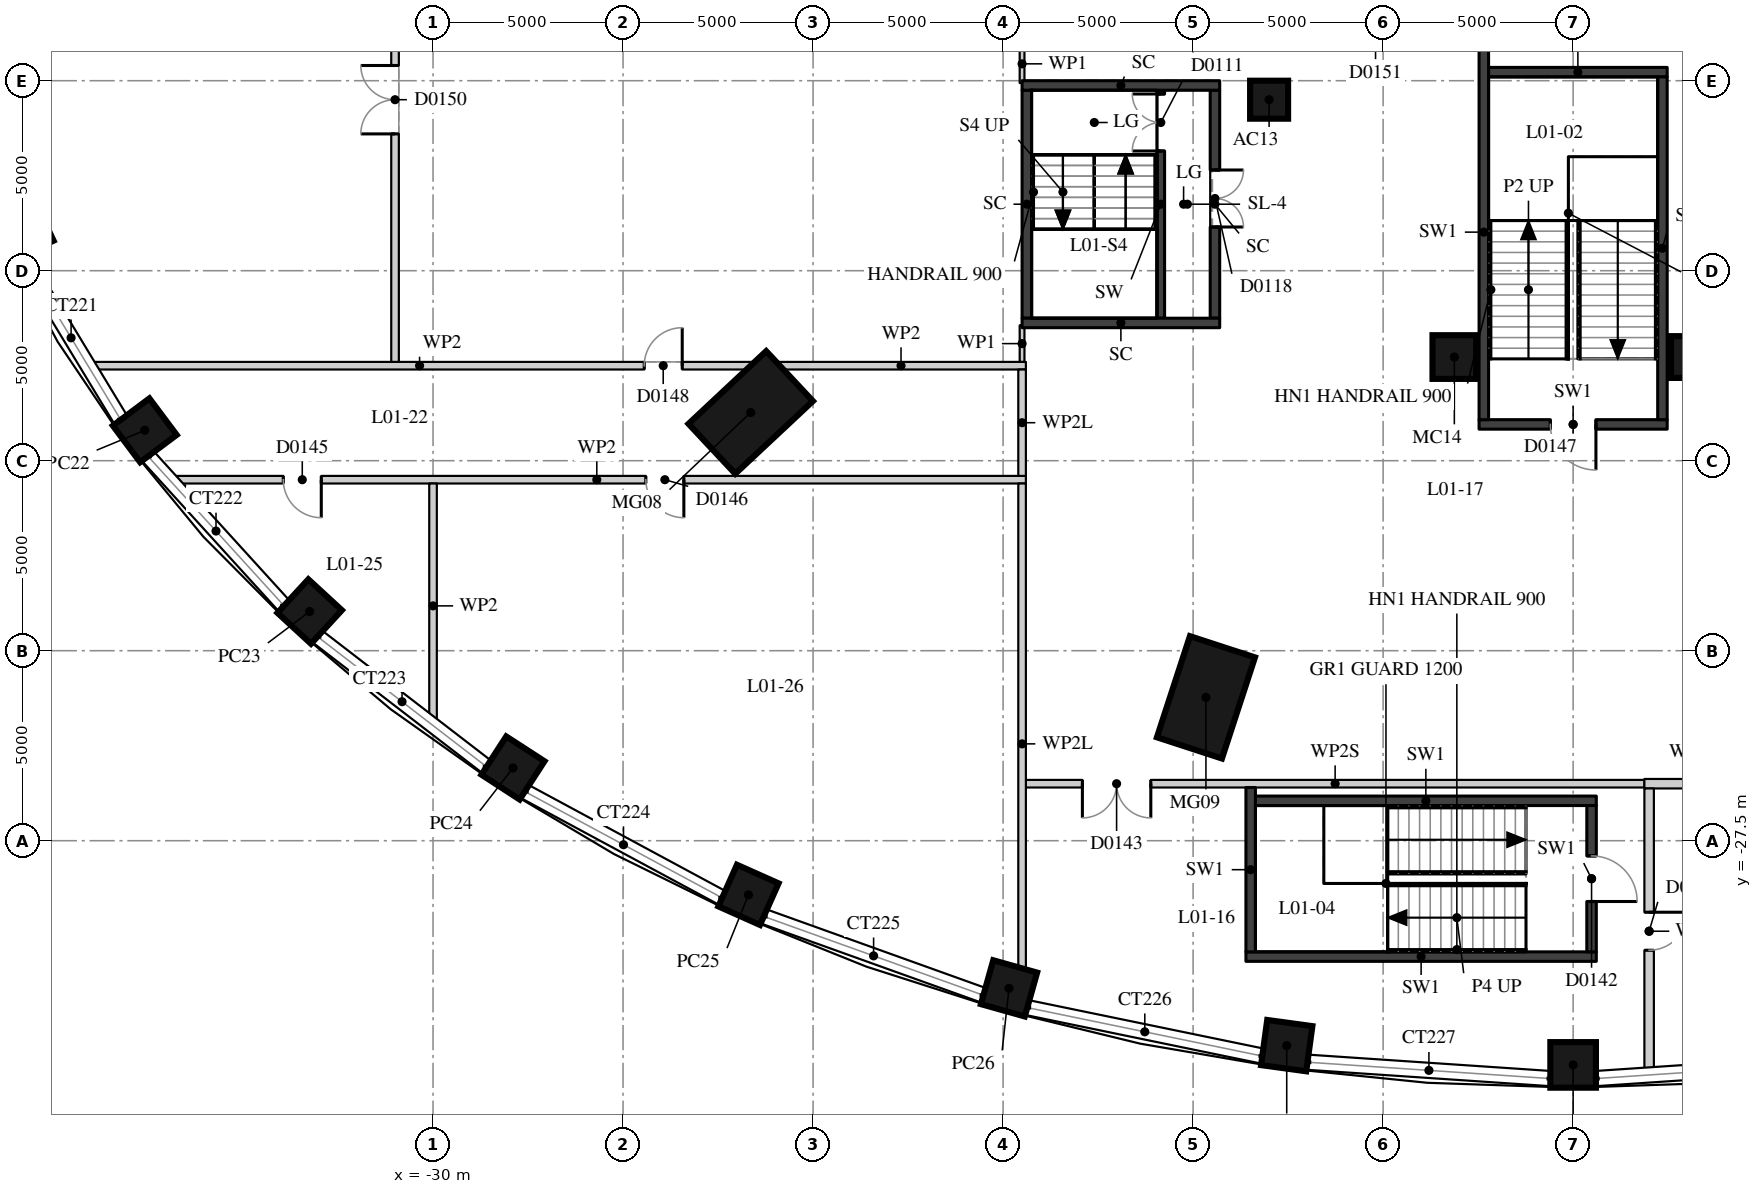
"""IFC4 building model, lengths in metres.
Left out: names, types, materials, properties, quantities, classifications, styles, units other than length and angle.
Written with IfcOpenShell. Run it as: python <this file> out.ifc"""

import sys

from ifc_helpers import new_model, si_unit, direction, frame, frame_2d, origin, origin_2d, place, context, subcontext, project, spatial, rectangle, extrude, element, fill, save


model = new_model("IFC4")
c1 = context("Model", 3, precision=1e-05, world=origin(), true_north=direction((0.0, 1.0)))
c2 = subcontext(c1, "Body", "Model", "MODEL_VIEW")
j1 = project(units=[si_unit("LENGTHUNIT", "METRE"), si_unit("PLANEANGLEUNIT", "RADIAN")], contexts=[c1])
p1 = place(None, origin())
s1 = spatial("IfcSite", under=j1, at=p1, CompositionType="ELEMENT")
p2 = place(p1, origin())
s2 = spatial("IfcBuilding", under=s1, at=p2, CompositionType="ELEMENT")
p3 = place(p2, frame((0.0, 0.0, 7.5)))
s3 = spatial("IfcBuildingStorey", under=s2, at=p3, CompositionType="ELEMENT", Elevation=7.5)
for number, where, z_axis, x_axis in (
    (1, (-21.641, -16.23, 0.0), (0.0, 0.0, 1.0), (-0.73, -0.683, 0.0)),
    (2, (-9.662, -23.727, 0.0), (0.0, 0.0, 1.0), (-0.31, -0.951, 0.0)),
):
    element("IfcColumn", number, at=place(p3, frame(where, z_axis=z_axis, x_axis=x_axis)), inside=s3, PredefinedType="COLUMN", context=c2, shape_type="SweptSolid", body=[
        extrude(rectangle(XDim=2.8, YDim=1.8, at=origin_2d()), origin(), (0.0, 0.0, 1.0), 5.0),
    ])
p4 = place(p3, frame((-8.0, -8.0, 0.0), z_axis=(0.0, 0.0, 1.0), x_axis=(1.0, 0.0, 0.0)))
e3 = element("IfcColumn", 3, at=p4, inside=s3, PredefinedType="COLUMN", context=c2, shape_type="SweptSolid", body=[
    extrude(rectangle(XDim=1.0, YDim=1.0, at=origin_2d()), origin(), (0.0, 0.0, 1.0), 5.0),
])
p5 = place(p3, frame((-3.126, -14.772, 0.0), z_axis=(0.0, 0.0, 1.0), x_axis=(1.0, 0.0, 0.0)))
e4 = element("IfcColumn", 4, at=p5, inside=s3, PredefinedType="COLUMN", context=c2, shape_type="SweptSolid", body=[
    extrude(rectangle(XDim=1.15, YDim=1.15, at=origin_2d()), origin(), (0.0, 0.0, 1.0), 5.0),
])
p6 = place(p3, frame((3.126, -14.772, 0.0), z_axis=(0.0, 0.0, 1.0), x_axis=(1.0, 0.0, 0.0)))
e5 = element("IfcColumn", 5, at=p6, inside=s3, PredefinedType="COLUMN", context=c2, shape_type="SweptSolid", body=[
    extrude(rectangle(XDim=1.1, YDim=1.1, at=origin_2d()), origin(), (0.0, 0.0, 1.0), 5.0),
])
for number, where, z_axis, x_axis in (
    (6, (-40.783, -11.424, 0.0), (0.0, 0.0, 1.0), (-0.905, -0.426, 0.0)),
    (7, (-37.585, -16.7, 0.0), (0.0, 0.0, 1.0), (-0.801, -0.599, 0.0)),
    (8, (-33.246, -21.469, 0.0), (0.0, 0.0, 1.0), (-0.677, -0.736, 0.0)),
    (9, (-27.897, -25.586, 0.0), (0.0, 0.0, 1.0), (-0.544, -0.839, 0.0)),
    (10, (-21.7, -28.925, 0.0), (0.0, 0.0, 1.0), (-0.407, -0.913, 0.0)),
    (11, (-14.844, -31.386, 0.0), (0.0, 0.0, 1.0), (-0.271, -0.963, 0.0)),
    (12, (-7.536, -32.893, 0.0), (0.0, 0.0, 1.0), (-0.135, -0.991, 0.0)),
    (13, (0.0, -33.4, 0.0), (0.0, 0.0, 1.0), (0.0, -1.0, 0.0)),
):
    element("IfcColumn", number, at=place(p3, frame(where, z_axis=z_axis, x_axis=x_axis)), inside=s3, PredefinedType="COLUMN", context=c2, shape_type="SweptSolid", body=[
        extrude(rectangle(XDim=1.2, YDim=1.2, at=origin_2d()), origin(), (0.0, 0.0, 1.0), 5.0),
    ])
p7 = place(p3, frame((-10.85, -13.75, 0.0), z_axis=(0.0, 0.0, 1.0), x_axis=(0.0, 1.0, 0.0)))
e14 = element("IfcWall", 14, at=p7, inside=s3, PredefinedType="SHEAR", context=c2, shape_type="SweptSolid", body=[
    extrude(rectangle(XDim=6.0, YDim=0.2, at=frame_2d((3.0, 0.0))), origin(), (0.0, 0.0, 1.0), 4.59),
])
p8 = place(p7, frame((4.4, 0.0, 0.0)))
e15 = element("IfcOpeningElement", 15, at=p8, cuts=e14, PredefinedType="OPENING", context=c2, shape_type="SweptSolid", body=[
    extrude(rectangle(XDim=1.5, YDim=2.1, at=frame_2d((0.75, 1.05))), frame((0.0, 0.11, 0.0), z_axis=(0.0, -1.0, 0.0), x_axis=(1.0, 0.0, 0.0)), (0.0, 0.0, 1.0), 0.22),
])
p9 = place(p3, frame((-14.375, -13.75, -0.41), z_axis=(0.0, 0.0, 1.0), x_axis=(0.0, 1.0, 0.0)))
e16 = element("IfcWall", 16, at=p9, inside=s3, PredefinedType="SHEAR", context=c2, shape_type="SweptSolid", body=[
    extrude(rectangle(XDim=6.0, YDim=0.25, at=frame_2d((3.0, 0.0))), origin(), (0.0, 0.0, 1.0), 5.0),
])
p10 = place(p3, frame((-9.425, -13.75, -0.41), z_axis=(0.0, 0.0, 1.0), x_axis=(0.0, 1.0, 0.0)))
e17 = element("IfcWall", 17, at=p10, inside=s3, PredefinedType="SHEAR", context=c2, shape_type="SweptSolid", body=[
    extrude(rectangle(XDim=6.0, YDim=0.25, at=frame_2d((3.0, 0.0))), origin(), (0.0, 0.0, 1.0), 5.0),
])
p11 = place(p10, frame((2.4, 0.0, 0.41)))
e18 = element("IfcOpeningElement", 18, at=p11, cuts=e17, PredefinedType="OPENING", context=c2, shape_type="SweptSolid", body=[
    extrude(rectangle(XDim=1.5, YDim=2.1, at=frame_2d((0.75, 1.05))), frame((0.0, 0.135, 0.0), z_axis=(0.0, -1.0, 0.0), x_axis=(1.0, 0.0, 0.0)), (0.0, 0.0, 1.0), 0.27),
])
for number, where, z_axis, x_axis in (
    (19, (-14.5, -7.625, -0.41), (0.0, 0.0, 1.0), (1.0, 0.0, 0.0)),
    (20, (-14.5, -13.875, -0.41), (0.0, 0.0, 1.0), (1.0, 0.0, 0.0)),
):
    element("IfcWall", number, at=place(p3, frame(where, z_axis=z_axis, x_axis=x_axis)), inside=s3, PredefinedType="SHEAR", context=c2, shape_type="SweptSolid", body=[
        extrude(rectangle(XDim=5.2, YDim=0.25, at=frame_2d((2.6, 0.0))), origin(), (0.0, 0.0, 1.0), 5.0),
    ])
p12 = place(p3, frame((-8.61, -30.55, 0.0), z_axis=(0.0, 0.0, 1.0), x_axis=(1.0, 0.0, 0.0)))
e21 = element("IfcWall", 21, at=p12, inside=s3, PredefinedType="SOLIDWALL", context=c2, shape_type="SweptSolid", body=[
    extrude(rectangle(XDim=9.22, YDim=0.25, at=frame_2d((4.61, 0.0))), origin(), (0.0, 0.0, 1.0), 4.59),
])
p13 = place(p3, frame((-8.36, -26.45, 0.0), z_axis=(0.0, 0.0, 1.0), x_axis=(1.0, 0.0, 0.0)))
e22 = element("IfcWall", 22, at=p13, inside=s3, PredefinedType="SOLIDWALL", context=c2, shape_type="SweptSolid", body=[
    extrude(rectangle(XDim=8.97, YDim=0.25, at=frame_2d((4.485, 0.0))), origin(), (0.0, 0.0, 1.0), 4.59),
])
p14 = place(p3, frame((-14.4, -26.0, 0.0), z_axis=(0.0, 0.0, 1.0), x_axis=(1.0, 0.0, 0.0)))
e23 = element("IfcWall", 23, at=p14, inside=s3, PredefinedType="PARTITIONING", context=c2, shape_type="SweptSolid", body=[
    extrude(rectangle(XDim=16.275, YDim=0.2, at=frame_2d((8.137, 0.0))), origin(), (0.0, 0.0, 1.0), 3.69),
])
p15 = place(p14, frame((1.487, 0.0, 0.0)))
e24 = element("IfcOpeningElement", 24, at=p15, cuts=e23, PredefinedType="OPENING", context=c2, shape_type="SweptSolid", body=[
    extrude(rectangle(XDim=1.8, YDim=2.1, at=frame_2d((0.9, 1.05))), frame((0.0, 0.11, 0.0), z_axis=(0.0, -1.0, 0.0), x_axis=(1.0, 0.0, 0.0)), (0.0, 0.0, 1.0), 0.22),
])
p16 = place(p3, frame((1.875, -26.0, 0.0), z_axis=(0.0, 0.0, 1.0), x_axis=(1.0, 0.0, 0.0)))
e25 = element("IfcWall", 25, at=p16, inside=s3, PredefinedType="PARTITIONING", context=c2, shape_type="SweptSolid", body=[
    extrude(rectangle(XDim=2.32, YDim=0.25, at=frame_2d((1.16, 0.0))), origin(), (0.0, 0.0, 1.0), 4.59),
])
p17 = place(p3, frame((-36.982, -18.0, 0.0), z_axis=(0.0, 0.0, 1.0), x_axis=(1.0, 0.0, 0.0)))
e26 = element("IfcWall", 26, at=p17, inside=s3, PredefinedType="PARTITIONING", context=c2, shape_type="SweptSolid", body=[
    extrude(rectangle(XDim=22.582, YDim=0.2, at=frame_2d((11.291, 0.0))), origin(), (0.0, 0.0, 1.0), 4.59),
])
p18 = place(p17, frame((3.041, 0.0, 0.0)))
e27 = element("IfcOpeningElement", 27, at=p18, cuts=e26, PredefinedType="OPENING", context=c2, shape_type="SweptSolid", body=[
    extrude(rectangle(XDim=1.0, YDim=2.1, at=frame_2d((0.5, 1.05))), frame((0.0, 0.11, 0.0), z_axis=(0.0, -1.0, 0.0), x_axis=(1.0, 0.0, 0.0)), (0.0, 0.0, 1.0), 0.22),
])
p19 = place(p17, frame((12.582, 0.0, 0.0)))
e28 = element("IfcOpeningElement", 28, at=p19, cuts=e26, PredefinedType="OPENING", context=c2, shape_type="SweptSolid", body=[
    extrude(rectangle(XDim=1.0, YDim=2.1, at=frame_2d((0.5, 1.05))), frame((0.0, 0.11, 0.0), z_axis=(0.0, -1.0, 0.0), x_axis=(1.0, 0.0, 0.0)), (0.0, 0.0, 1.0), 0.22),
])
p20 = place(p3, frame((-2.475, -16.545, 0.0), z_axis=(0.0, 0.0, 1.0), x_axis=(1.0, 0.0, 0.0)))
e29 = element("IfcWall", 29, at=p20, inside=s3, PredefinedType="SOLIDWALL", context=c2, shape_type="SweptSolid", body=[
    extrude(rectangle(XDim=4.95, YDim=0.25, at=frame_2d((2.475, 0.0))), origin(), (0.0, 0.0, 1.0), 4.59),
])
p21 = place(p20, frame((1.875, 0.0, 0.0)))
e30 = element("IfcOpeningElement", 30, at=p21, cuts=e29, PredefinedType="OPENING", context=c2, shape_type="SweptSolid", body=[
    extrude(rectangle(XDim=1.2, YDim=2.1, at=frame_2d((0.6, 1.05))), frame((0.0, 0.135, 0.0), z_axis=(0.0, -1.0, 0.0), x_axis=(1.0, 0.0, 0.0)), (0.0, 0.0, 1.0), 0.27),
])
p22 = place(p3, frame((-39.165, -15.0, 0.0), z_axis=(0.0, 0.0, 1.0), x_axis=(1.0, 0.0, 0.0)))
e31 = element("IfcWall", 31, at=p22, inside=s3, PredefinedType="PARTITIONING", context=c2, shape_type="SweptSolid", body=[
    extrude(rectangle(XDim=17.622, YDim=0.2, at=frame_2d((8.811, 0.0))), origin(), (0.0, 0.0, 1.0), 4.59),
])
p23 = place(p22, frame((14.722, 0.0, 0.0)))
e32 = element("IfcOpeningElement", 32, at=p23, cuts=e31, PredefinedType="OPENING", context=c2, shape_type="SweptSolid", body=[
    extrude(rectangle(XDim=1.0, YDim=2.1, at=frame_2d((0.5, 1.05))), frame((0.0, 0.11, 0.0), z_axis=(0.0, -1.0, 0.0), x_axis=(1.0, 0.0, 0.0)), (0.0, 0.0, 1.0), 0.22),
])
p24 = place(p3, frame((-20.971, -15.0, 0.0), z_axis=(0.0, 0.0, 1.0), x_axis=(1.0, 0.0, 0.0)))
e33 = element("IfcWall", 33, at=p24, inside=s3, PredefinedType="PARTITIONING", context=c2, shape_type="SweptSolid", body=[
    extrude(rectangle(XDim=6.571, YDim=0.2, at=frame_2d((3.286, 0.0))), origin(), (0.0, 0.0, 1.0), 4.59),
])
p25 = place(p3, frame((-2.225, -7.275, 0.0), z_axis=(0.0, 0.0, 1.0), x_axis=(1.0, 0.0, 0.0)))
e34 = element("IfcWall", 34, at=p25, inside=s3, PredefinedType="SOLIDWALL", context=c2, shape_type="SweptSolid", body=[
    extrude(rectangle(XDim=4.7, YDim=0.25, at=frame_2d((2.35, 0.0))), origin(), (0.0, 0.0, 1.0), 4.59),
])
p26 = place(p3, frame((-31.0, -14.9, 0.0), z_axis=(0.0, 0.0, 1.0), x_axis=(0.0, 1.0, 0.0)))
e35 = element("IfcWall", 35, at=p26, inside=s3, PredefinedType="PARTITIONING", context=c2, shape_type="SweptSolid", body=[
    extrude(rectangle(XDim=29.8, YDim=0.2, at=frame_2d((14.9, 0.0))), origin(), (0.0, 0.0, 1.0), 4.59),
])
p27 = place(p26, frame((6.0, 0.0, 0.0)))
e36 = element("IfcOpeningElement", 36, at=p27, cuts=e35, PredefinedType="OPENING", context=c2, shape_type="SweptSolid", body=[
    extrude(rectangle(XDim=1.8, YDim=2.1, at=frame_2d((0.9, 1.05))), frame((0.0, 0.11, 0.0), z_axis=(0.0, -1.0, 0.0), x_axis=(1.0, 0.0, 0.0)), (0.0, 0.0, 1.0), 0.22),
])
p28 = place(p3, frame((-30.0, -24.54, 0.0), z_axis=(0.0, 0.0, 1.0), x_axis=(0.0, 1.0, 0.0)))
e37 = element("IfcWall", 37, at=p28, inside=s3, PredefinedType="PARTITIONING", context=c2, shape_type="SweptSolid", body=[
    extrude(rectangle(XDim=6.44, YDim=0.2, at=frame_2d((3.22, 0.0))), origin(), (0.0, 0.0, 1.0), 4.59),
])
p29 = place(p3, frame((-14.5, -31.803, 0.0), z_axis=(0.0, 0.0, 1.0), x_axis=(0.0, 1.0, 0.0)))
e38 = element("IfcWall", 38, at=p29, inside=s3, PredefinedType="PARTITIONING", context=c2, shape_type="SweptSolid", body=[
    extrude(rectangle(XDim=13.703, YDim=0.2, at=frame_2d((6.852, 0.0))), origin(), (0.0, 0.0, 1.0), 4.14),
])
p30 = place(p3, frame((-14.5, -17.9, 0.0), z_axis=(0.0, 0.0, 1.0), x_axis=(0.0, 1.0, 0.0)))
e39 = element("IfcWall", 39, at=p30, inside=s3, PredefinedType="PARTITIONING", context=c2, shape_type="SweptSolid", body=[
    extrude(rectangle(XDim=2.8, YDim=0.2, at=frame_2d((1.4, 0.0))), origin(), (0.0, 0.0, 1.0), 4.14),
])
p31 = place(p3, frame((-14.5, -14.9, 0.0), z_axis=(0.0, 0.0, 1.0), x_axis=(0.0, 1.0, 0.0)))
e40 = element("IfcWall", 40, at=p31, inside=s3, PredefinedType="PARTITIONING", context=c2, shape_type="SweptSolid", body=[
    extrude(rectangle(XDim=0.962, YDim=0.125, at=frame_2d((0.481, 0.0))), origin(), (0.0, 0.0, 1.0), 4.59),
])
p32 = place(p3, frame((-14.5, -7.562, 0.0), z_axis=(0.0, 0.0, 1.0), x_axis=(0.0, 1.0, 0.0)))
e41 = element("IfcWall", 41, at=p32, inside=s3, PredefinedType="PARTITIONING", context=c2, shape_type="SweptSolid", body=[
    extrude(rectangle(XDim=1.012, YDim=0.125, at=frame_2d((0.506, 0.0))), origin(), (0.0, 0.0, 1.0), 4.59),
])
p33 = place(p3, frame((-8.485, -30.425, 0.0), z_axis=(0.0, 0.0, 1.0), x_axis=(0.0, 1.0, 0.0)))
e42 = element("IfcWall", 42, at=p33, inside=s3, PredefinedType="SOLIDWALL", context=c2, shape_type="SweptSolid", body=[
    extrude(rectangle(XDim=4.325, YDim=0.25, at=frame_2d((2.163, 0.0))), origin(), (0.0, 0.0, 1.0), 4.59),
])
p34 = place(p3, frame((-2.35, -16.42, 0.0), z_axis=(0.0, 0.0, 1.0), x_axis=(0.0, 1.0, 0.0)))
e43 = element("IfcWall", 43, at=p34, inside=s3, PredefinedType="SOLIDWALL", context=c2, shape_type="SweptSolid", body=[
    extrude(rectangle(XDim=9.87, YDim=0.25, at=frame_2d((4.935, 0.0))), origin(), (0.0, 0.0, 1.0), 4.59),
])
p35 = place(p3, frame((0.485, -30.425, 0.0), z_axis=(0.0, 0.0, 1.0), x_axis=(0.0, 1.0, 0.0)))
e44 = element("IfcWall", 44, at=p35, inside=s3, PredefinedType="SOLIDWALL", context=c2, shape_type="SweptSolid", body=[
    extrude(rectangle(XDim=3.85, YDim=0.25, at=frame_2d((1.925, 0.0))), origin(), (0.0, 0.0, 1.0), 4.59),
])
p36 = place(p35, frame((1.325, 0.0, 0.0)))
e45 = element("IfcOpeningElement", 45, at=p36, cuts=e44, PredefinedType="OPENING", context=c2, shape_type="SweptSolid", body=[
    extrude(rectangle(XDim=1.2, YDim=2.1, at=frame_2d((0.6, 1.05))), frame((0.0, 0.135, 0.0), z_axis=(0.0, -1.0, 0.0), x_axis=(1.0, 0.0, 0.0)), (0.0, 0.0, 1.0), 0.27),
])
p37 = place(p3, frame((2.0, -33.639, 0.0), z_axis=(0.0, 0.0, 1.0), x_axis=(0.0, 1.0, 0.0)))
e46 = element("IfcWall", 46, at=p37, inside=s3, PredefinedType="PARTITIONING", context=c2, shape_type="SweptSolid", body=[
    extrude(rectangle(XDim=7.514, YDim=0.25, at=frame_2d((3.757, 0.0))), origin(), (0.0, 0.0, 1.0), 4.59),
])
p38 = place(p37, frame((3.257, 0.0, 0.0)))
e47 = element("IfcOpeningElement", 47, at=p38, cuts=e46, PredefinedType="OPENING", context=c2, shape_type="SweptSolid", body=[
    extrude(rectangle(XDim=1.0, YDim=2.1, at=frame_2d((0.5, 1.05))), frame((0.0, 0.135, 0.0), z_axis=(0.0, -1.0, 0.0), x_axis=(1.0, 0.0, 0.0)), (0.0, 0.0, 1.0), 0.27),
])
p39 = place(p3, frame((2.35, -16.42, 0.0), z_axis=(0.0, 0.0, 1.0), x_axis=(0.0, 1.0, 0.0)))
e48 = element("IfcWall", 48, at=p39, inside=s3, PredefinedType="SOLIDWALL", context=c2, shape_type="SweptSolid", body=[
    extrude(rectangle(XDim=9.02, YDim=0.25, at=frame_2d((4.51, 0.0))), origin(), (0.0, 0.0, 1.0), 4.59),
])
p40 = place(p8, origin())
e49 = element("IfcDoor", 49, at=p40, inside=s3, OperationType="DOUBLE_DOOR_SINGLE_SWING", PredefinedType="DOOR", context=c2, shape_type="SweptSolid", body=[
    extrude(rectangle(XDim=1.5, YDim=2.1, at=frame_2d((0.75, 1.05))), frame((0.0, 0.025, 0.0), z_axis=(0.0, -1.0, 0.0), x_axis=(1.0, 0.0, 0.0)), (0.0, 0.0, 1.0), 0.05),
])
fill(e15, e49)
p41 = place(p11, origin())
e50 = element("IfcDoor", 50, at=p41, inside=s3, OperationType="DOUBLE_DOOR_SINGLE_SWING", PredefinedType="DOOR", context=c2, shape_type="SweptSolid", body=[
    extrude(rectangle(XDim=1.5, YDim=2.1, at=frame_2d((0.75, 1.05))), frame((0.0, 0.025, 0.0), z_axis=(0.0, -1.0, 0.0), x_axis=(1.0, 0.0, 0.0)), (0.0, 0.0, 1.0), 0.05),
])
fill(e18, e50)
p42 = place(p27, origin())
e51 = element("IfcDoor", 51, at=p42, inside=s3, OperationType="DOUBLE_DOOR_SINGLE_SWING", PredefinedType="DOOR", context=c2, shape_type="SweptSolid", body=[
    extrude(rectangle(XDim=1.8, YDim=2.1, at=frame_2d((0.9, 1.05))), frame((0.0, 0.025, 0.0), z_axis=(0.0, -1.0, 0.0), x_axis=(1.0, 0.0, 0.0)), (0.0, 0.0, 1.0), 0.05),
])
fill(e36, e51)
p43 = place(p23, origin())
e52 = element("IfcDoor", 52, at=p43, inside=s3, OperationType="SINGLE_SWING_RIGHT", PredefinedType="DOOR", context=c2, shape_type="SweptSolid", body=[
    extrude(rectangle(XDim=1.0, YDim=2.1, at=frame_2d((0.5, 1.05))), frame((0.0, 0.025, 0.0), z_axis=(0.0, -1.0, 0.0), x_axis=(1.0, 0.0, 0.0)), (0.0, 0.0, 1.0), 0.05),
])
fill(e32, e52)
p44 = place(p15, origin())
e53 = element("IfcDoor", 53, at=p44, inside=s3, OperationType="DOUBLE_DOOR_SINGLE_SWING", PredefinedType="DOOR", context=c2, shape_type="SweptSolid", body=[
    extrude(rectangle(XDim=1.8, YDim=2.1, at=frame_2d((0.9, 1.05))), frame((0.0, 0.025, 0.0), z_axis=(0.0, -1.0, 0.0), x_axis=(1.0, 0.0, 0.0)), (0.0, 0.0, 1.0), 0.05),
])
fill(e24, e53)
p45 = place(p38, origin())
e54 = element("IfcDoor", 54, at=p45, inside=s3, OperationType="SINGLE_SWING_LEFT", PredefinedType="DOOR", context=c2, shape_type="SweptSolid", body=[
    extrude(rectangle(XDim=1.0, YDim=2.1, at=frame_2d((0.5, 1.05))), frame((0.0, 0.025, 0.0), z_axis=(0.0, -1.0, 0.0), x_axis=(1.0, 0.0, 0.0)), (0.0, 0.0, 1.0), 0.05),
])
fill(e47, e54)
p46 = place(p18, origin())
e55 = element("IfcDoor", 55, at=p46, inside=s3, OperationType="SINGLE_SWING_LEFT", PredefinedType="DOOR", context=c2, shape_type="SweptSolid", body=[
    extrude(rectangle(XDim=1.0, YDim=2.1, at=frame_2d((0.5, 1.05))), frame((0.0, 0.025, 0.0), z_axis=(0.0, -1.0, 0.0), x_axis=(1.0, 0.0, 0.0)), (0.0, 0.0, 1.0), 0.05),
])
fill(e27, e55)
p47 = place(p19, origin())
e56 = element("IfcDoor", 56, at=p47, inside=s3, OperationType="SINGLE_SWING_LEFT", PredefinedType="DOOR", context=c2, shape_type="SweptSolid", body=[
    extrude(rectangle(XDim=1.0, YDim=2.1, at=frame_2d((0.5, 1.05))), frame((0.0, 0.025, 0.0), z_axis=(0.0, -1.0, 0.0), x_axis=(1.0, 0.0, 0.0)), (0.0, 0.0, 1.0), 0.05),
])
fill(e28, e56)
p48 = place(p21, origin())
e57 = element("IfcDoor", 57, at=p48, inside=s3, OperationType="SINGLE_SWING_LEFT", PredefinedType="DOOR", context=c2, shape_type="SweptSolid", body=[
    extrude(rectangle(XDim=1.2, YDim=2.1, at=frame_2d((0.6, 1.05))), frame((0.0, 0.025, 0.0), z_axis=(0.0, -1.0, 0.0), x_axis=(1.0, 0.0, 0.0)), (0.0, 0.0, 1.0), 0.05),
])
fill(e30, e57)
p49 = place(p36, origin())
e58 = element("IfcDoor", 58, at=p49, inside=s3, OperationType="SINGLE_SWING_RIGHT", PredefinedType="DOOR", context=c2, shape_type="SweptSolid", body=[
    extrude(rectangle(XDim=1.2, YDim=2.1, at=frame_2d((0.6, 1.05))), frame((0.0, 0.025, 0.0), z_axis=(0.0, -1.0, 0.0), x_axis=(1.0, 0.0, 0.0)), (0.0, 0.0, 1.0), 0.05),
])
fill(e45, e58)
save(model, sys.argv[1])
